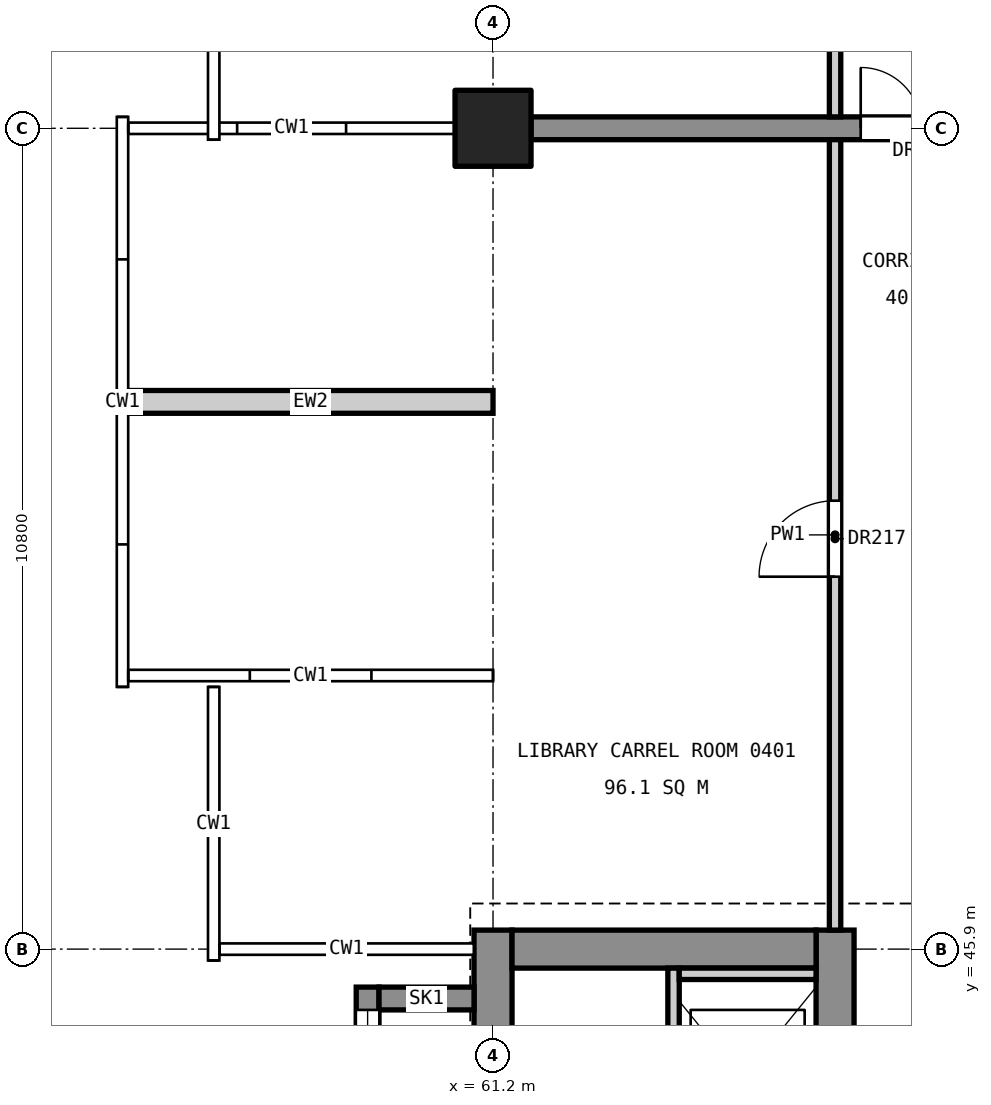
"""IFC4 building model, lengths in metres.
Left out: names, types, materials, properties, quantities, classifications, styles, units other than length and angle.
Written with IfcOpenShell. Run it as: python <this file> out.ifc"""

import sys

from ifc_helpers import new_model, si_unit, direction, frame, frame_2d, origin, origin_2d, place, context, subcontext, project, spatial, rectangle, extrude, element, fill, save


model = new_model("IFC4")
c1 = context("Model", 3, precision=1e-05, world=origin(), true_north=direction((0.0, 1.0)))
c2 = subcontext(c1, "Body", "Model", "MODEL_VIEW")
j1 = project(units=[si_unit("LENGTHUNIT", "METRE"), si_unit("PLANEANGLEUNIT", "RADIAN")], contexts=[c1])
p1 = place(None, origin())
s1 = spatial("IfcSite", under=j1, at=p1, CompositionType="ELEMENT")
p2 = place(p1, origin())
s2 = spatial("IfcBuilding", under=s1, at=p2, CompositionType="ELEMENT")
p3 = place(p2, frame((0.0, 0.0, 22.2)))
s3 = spatial("IfcBuildingStorey", under=s2, at=p3, CompositionType="ELEMENT", Elevation=22.2)
p4 = place(p3, frame((61.2, 56.7, 0.0), z_axis=(0.0, 0.0, 1.0), x_axis=(1.0, 0.0, 0.0)))
e1 = element("IfcColumn", 1, at=p4, inside=s3, PredefinedType="COLUMN", context=c2, shape_type="SweptSolid", body=[
    extrude(rectangle(XDim=1.0, YDim=1.0, at=origin_2d()), origin(), (0.0, 0.0, 1.0), 4.8),
])
p5 = place(p3, frame((61.2, 34.85, 0.0), z_axis=(0.0, 0.0, 1.0), x_axis=(0.0, 1.0, 0.0)))
e2 = element("IfcWall", 2, at=p5, inside=s3, PredefinedType="SHEAR", context=c2, shape_type="SweptSolid", body=[
    extrude(rectangle(XDim=11.3, YDim=0.5, at=frame_2d((5.65, 0.0))), origin(), (0.0, 0.0, 1.0), 4.55),
])
p6 = place(p5, frame((6.16, 0.0, 3.4)))
e3 = element("IfcOpeningElement", 3, at=p6, cuts=e2, PredefinedType="OPENING", context=c2, shape_type="SweptSolid", body=[
    extrude(rectangle(XDim=1.2, YDim=0.9, at=frame_2d((0.6, 0.45))), frame((0.0, 0.26, 0.0), z_axis=(0.0, -1.0, 0.0), x_axis=(1.0, 0.0, 0.0)), (0.0, 0.0, 1.0), 0.52),
])
p7 = place(p3, frame((65.7, 34.85, 0.0), z_axis=(0.0, 0.0, 1.0), x_axis=(0.0, 1.0, 0.0)))
e4 = element("IfcWall", 4, at=p7, inside=s3, PredefinedType="SHEAR", context=c2, shape_type="SweptSolid", body=[
    extrude(rectangle(XDim=11.3, YDim=0.5, at=frame_2d((5.65, 0.0))), origin(), (0.0, 0.0, 1.0), 4.55),
])
p8 = place(p7, frame((0.55, 0.0, 0.0)))
e5 = element("IfcOpeningElement", 5, at=p8, cuts=e4, PredefinedType="OPENING", context=c2, shape_type="SweptSolid", body=[
    extrude(rectangle(XDim=1.4, YDim=2.1, at=frame_2d((0.7, 1.05))), frame((0.0, 0.26, 0.0), z_axis=(0.0, -1.0, 0.0), x_axis=(1.0, 0.0, 0.0)), (0.0, 0.0, 1.0), 0.52),
])
p9 = place(p7, frame((8.8, 0.0, 0.0)))
e6 = element("IfcOpeningElement", 6, at=p9, cuts=e4, PredefinedType="OPENING", context=c2, shape_type="SweptSolid", body=[
    extrude(rectangle(XDim=1.1, YDim=2.1, at=frame_2d((0.55, 1.05))), frame((0.0, 0.26, 0.0), z_axis=(0.0, -1.0, 0.0), x_axis=(1.0, 0.0, 0.0)), (0.0, 0.0, 1.0), 0.52),
])
p10 = place(p3, frame((61.45, 45.9, 0.0), z_axis=(0.0, 0.0, 1.0), x_axis=(1.0, 0.0, 0.0)))
e7 = element("IfcWall", 7, at=p10, inside=s3, PredefinedType="SHEAR", context=c2, shape_type="SweptSolid", body=[
    extrude(rectangle(XDim=4.0, YDim=0.5, at=frame_2d((2.0, 0.0))), origin(), (0.0, 0.0, 1.0), 4.55),
])
p11 = place(p3, frame((59.55, 43.0, 0.0), z_axis=(0.0, 0.0, 1.0), x_axis=(0.0, 1.0, 0.0)))
e8 = element("IfcWall", 8, at=p11, inside=s3, PredefinedType="SHEAR", context=c2, shape_type="SweptSolid", body=[
    extrude(rectangle(XDim=2.4, YDim=0.3, at=frame_2d((1.2, 0.0))), origin(), (0.0, 0.0, 1.0), 4.8),
])
p12 = place(p11, frame((0.3, 0.0, 3.0)))
e9 = element("IfcOpeningElement", 9, at=p12, cuts=e8, PredefinedType="OPENING", context=c2, shape_type="SweptSolid", body=[
    extrude(rectangle(XDim=1.8, YDim=1.2, at=frame_2d((0.9, 0.6))), frame((0.0, 0.16, 0.0), z_axis=(0.0, -1.0, 0.0), x_axis=(1.0, 0.0, 0.0)), (0.0, 0.0, 1.0), 0.32),
])
p13 = place(p3, frame((60.95, 45.25, 0.0), z_axis=(0.0, 0.0, 1.0), x_axis=(-1.0, 0.0, 0.0)))
e10 = element("IfcWall", 10, at=p13, inside=s3, PredefinedType="SHEAR", context=c2, shape_type="SweptSolid", body=[
    extrude(rectangle(XDim=1.25, YDim=0.3, at=frame_2d((0.625, 0.0))), origin(), (0.0, 0.0, 1.0), 4.8),
])
p14 = place(p3, frame((61.7, 56.7, 0.0), z_axis=(0.0, 0.0, 1.0), x_axis=(1.0, 0.0, 0.0)))
e11 = element("IfcWall", 11, at=p14, inside=s3, PredefinedType="SHEAR", context=c2, shape_type="SweptSolid", body=[
    extrude(rectangle(XDim=6.2, YDim=0.3, at=frame_2d((3.1, 0.0))), origin(), (0.0, 0.0, 1.0), 4.55),
])
p15 = place(p14, frame((4.337, 0.0, 0.0)))
e12 = element("IfcOpeningElement", 12, at=p15, cuts=e11, PredefinedType="OPENING", context=c2, shape_type="SweptSolid", body=[
    extrude(rectangle(XDim=1.6, YDim=2.1, at=frame_2d((0.8, 1.05))), frame((0.0, 0.16, 0.0), z_axis=(0.0, -1.0, 0.0), x_axis=(1.0, 0.0, 0.0)), (0.0, 0.0, 1.0), 0.32),
])
p16 = place(p3, frame((63.575, 43.0, 0.0), z_axis=(0.0, 0.0, 1.0), x_axis=(0.0, 1.0, 0.0)))
e13 = element("IfcWall", 13, at=p16, inside=s3, PredefinedType="SOLIDWALL", context=c2, shape_type="SweptSolid", body=[
    extrude(rectangle(XDim=2.65, YDim=0.15, at=frame_2d((1.325, 0.0))), origin(), (0.0, 0.0, 1.0), 4.8),
])
p17 = place(p3, frame((63.65, 45.575, 0.0), z_axis=(0.0, 0.0, 1.0), x_axis=(1.0, 0.0, 0.0)))
e14 = element("IfcWall", 14, at=p17, inside=s3, PredefinedType="SOLIDWALL", context=c2, shape_type="SweptSolid", body=[
    extrude(rectangle(XDim=1.8, YDim=0.15, at=frame_2d((0.9, 0.0))), origin(), (0.0, 0.0, 1.0), 4.8),
])
p18 = place(p3, frame((56.4, 53.1, 0.0), z_axis=(0.0, 0.0, 1.0), x_axis=(1.0, 0.0, 0.0)))
e15 = element("IfcWall", 15, at=p18, inside=s3, PredefinedType="STANDARD", context=c2, shape_type="SweptSolid", body=[
    extrude(rectangle(XDim=4.8, YDim=0.3, at=frame_2d((2.4, 0.0))), origin(), (0.0, 0.0, 1.0), 3.65),
])
p19 = place(p3, frame((65.7, 46.15, 0.0), z_axis=(0.0, 0.0, 1.0), x_axis=(0.0, 1.0, 0.0)))
e16 = element("IfcWall", 16, at=p19, inside=s3, PredefinedType="PARTITIONING", context=c2, shape_type="SweptSolid", body=[
    extrude(rectangle(XDim=10.4, YDim=0.15, at=frame_2d((5.2, 0.0))), origin(), (0.0, 0.0, 1.0), 3.55),
])
p20 = place(p19, frame((4.65, 0.0, 0.0)))
e17 = element("IfcOpeningElement", 17, at=p20, cuts=e16, PredefinedType="OPENING", context=c2, shape_type="SweptSolid", body=[
    extrude(rectangle(XDim=1.0, YDim=2.1, at=frame_2d((0.5, 1.05))), frame((0.0, 0.085, 0.0), z_axis=(0.0, -1.0, 0.0), x_axis=(1.0, 0.0, 0.0)), (0.0, 0.0, 1.0), 0.17),
])
p21 = place(p3, frame((65.7, 56.85, 0.0), z_axis=(0.0, 0.0, 1.0), x_axis=(0.0, 1.0, 0.0)))
e18 = element("IfcWall", 18, at=p21, inside=s3, PredefinedType="PARTITIONING", context=c2, shape_type="SweptSolid", body=[
    extrude(rectangle(XDim=3.2, YDim=0.15, at=frame_2d((1.6, 0.0))), origin(), (0.0, 0.0, 1.0), 3.55),
])
p22 = place(p21, frame((1.15, 0.0, 0.0)))
e19 = element("IfcOpeningElement", 19, at=p22, cuts=e18, PredefinedType="OPENING", context=c2, shape_type="SweptSolid", body=[
    extrude(rectangle(XDim=1.0, YDim=2.1, at=frame_2d((0.5, 1.05))), frame((0.0, 0.085, 0.0), z_axis=(0.0, -1.0, 0.0), x_axis=(1.0, 0.0, 0.0)), (0.0, 0.0, 1.0), 0.17),
])
p23 = place(p12, origin())
e20 = element("IfcWindow", 20, at=p23, inside=s3, PartitioningType="SINGLE_PANEL", PredefinedType="WINDOW", context=c2, shape_type="SweptSolid", body=[
    extrude(rectangle(XDim=1.8, YDim=1.2, at=frame_2d((0.9, 0.6))), frame((0.0, 0.03, 0.0), z_axis=(0.0, -1.0, 0.0), x_axis=(1.0, 0.0, 0.0)), (0.0, 0.0, 1.0), 0.06),
])
fill(e9, e20)
p24 = place(p20, origin())
e21 = element("IfcDoor", 21, at=p24, inside=s3, OperationType="SINGLE_SWING_LEFT", PredefinedType="DOOR", context=c2, shape_type="SweptSolid", body=[
    extrude(rectangle(XDim=1.0, YDim=2.1, at=frame_2d((0.5, 1.05))), frame((0.0, 0.025, 0.0), z_axis=(0.0, -1.0, 0.0), x_axis=(1.0, 0.0, 0.0)), (0.0, 0.0, 1.0), 0.05),
])
fill(e17, e21)
p25 = place(p15, origin())
e22 = element("IfcDoor", 22, at=p25, inside=s3, OperationType="DOUBLE_DOOR_SINGLE_SWING", PredefinedType="DOOR", context=c2, shape_type="SweptSolid", body=[
    extrude(rectangle(XDim=1.6, YDim=2.1, at=frame_2d((0.8, 1.05))), frame((0.0, 0.025, 0.0), z_axis=(0.0, -1.0, 0.0), x_axis=(1.0, 0.0, 0.0)), (0.0, 0.0, 1.0), 0.05),
])
fill(e12, e22)
save(model, sys.argv[1])
